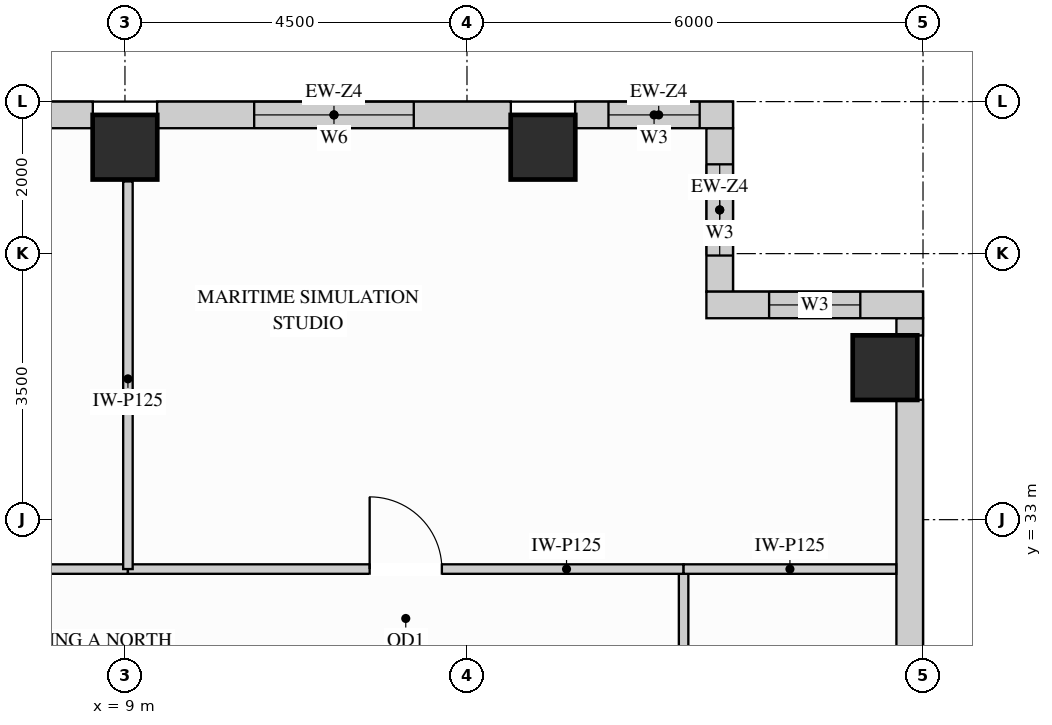
"""IFC4 building model, lengths in metres.
Left out: names, types, materials, properties, quantities, classifications, styles, units other than length and angle.
Written with IfcOpenShell. Run it as: python <this file> out.ifc"""

import sys

from ifc_helpers import new_model, si_unit, direction, frame, frame_2d, origin, origin_2d, place, context, subcontext, project, spatial, rectangle, extrude, source, transform, mapped, element, fill, save


model = new_model("IFC4")
c1 = context("Model", 3, precision=1e-05, world=origin(), true_north=direction((0.0, 1.0)))
c2 = subcontext(c1, "Body", "Model", "MODEL_VIEW")
j1 = project(units=[si_unit("LENGTHUNIT", "METRE"), si_unit("PLANEANGLEUNIT", "RADIAN")], contexts=[c1])
p1 = place(None, origin())
s1 = spatial("IfcSite", under=j1, at=p1, CompositionType="ELEMENT")
p2 = place(p1, origin())
s2 = spatial("IfcBuilding", under=s1, at=p2, CompositionType="ELEMENT")
p3 = place(p2, frame((0.0, 0.0, 266.4)))
s3 = spatial("IfcBuildingStorey", under=s2, at=p3, CompositionType="ELEMENT", Elevation=266.4)
m1 = source(origin(), c2, "Body", "SweptSolid", [
    extrude(rectangle(XDim=0.85, YDim=0.85, at=origin_2d()), origin(), (0.0, 0.0, 1.0), 3.4),
])
for number, where, z_axis, x_axis in (
    (1, (19.0, 35.0, 0.0), (0.0, 0.0, 1.0), (1.0, 0.0, 0.0)),
    (2, (14.5, 37.9, 0.0), (0.0, 0.0, 1.0), (1.0, 0.0, 0.0)),
    (3, (9.0, 37.9, 0.0), (0.0, 0.0, 1.0), (1.0, 0.0, 0.0)),
):
    element("IfcColumn", number, at=place(p3, frame(where, z_axis=z_axis, x_axis=x_axis)), inside=s3, PredefinedType="COLUMN", context=c2, shape_type="MappedRepresentation", body=[
        mapped(m1, transform((0.0, 0.0, 0.0), x_axis=(1.0, 0.0, 0.0), y_axis=(0.0, 1.0, 0.0), z_axis=(0.0, 0.0, 1.0))),
    ])
p4 = place(p3, frame((16.825, 35.998, 0.0), z_axis=(0.0, 0.0, 1.0), x_axis=(0.0, 1.0, 0.0)))
e4 = element("IfcWall", 4, at=p4, inside=s3, PredefinedType="SOLIDWALL", context=c2, shape_type="SweptSolid", body=[
    extrude(rectangle(XDim=2.154, YDim=0.35, at=frame_2d((1.077, 0.0))), origin(), (0.0, 0.0, 1.0), 3.385),
])
p5 = place(p4, frame((0.477, 0.0, 0.78)))
e5 = element("IfcOpeningElement", 5, at=p5, cuts=e4, PredefinedType="OPENING", context=c2, shape_type="SweptSolid", body=[
    extrude(rectangle(XDim=1.2, YDim=2.25, at=frame_2d((0.6, 1.125))), frame((0.0, 0.185, 0.0), z_axis=(0.0, -1.0, 0.0), x_axis=(1.0, 0.0, 0.0)), (0.0, 0.0, 1.0), 0.37),
])
p6 = place(p3, frame((17.0, 38.325, 0.0), z_axis=(0.0, 0.0, 1.0), x_axis=(-1.0, 0.0, 0.0)))
e6 = element("IfcWall", 6, at=p6, inside=s3, PredefinedType="SOLIDWALL", context=c2, shape_type="SweptSolid", body=[
    extrude(rectangle(XDim=2.077, YDim=0.35, at=frame_2d((1.039, 0.0))), origin(), (0.0, 0.0, 1.0), 3.385),
])
p7 = place(p6, frame((0.438, 0.0, 0.78)))
e7 = element("IfcOpeningElement", 7, at=p7, cuts=e6, PredefinedType="OPENING", context=c2, shape_type="SweptSolid", body=[
    extrude(rectangle(XDim=1.2, YDim=2.25, at=frame_2d((0.6, 1.125))), frame((0.0, 0.185, 0.0), z_axis=(0.0, -1.0, 0.0), x_axis=(1.0, 0.0, 0.0)), (0.0, 0.0, 1.0), 0.37),
])
p8 = place(p3, frame((14.077, 38.325, 0.0), z_axis=(0.0, 0.0, 1.0), x_axis=(-1.0, 0.0, 0.0)))
e8 = element("IfcWall", 8, at=p8, inside=s3, PredefinedType="SOLIDWALL", context=c2, shape_type="SweptSolid", body=[
    extrude(rectangle(XDim=4.654, YDim=0.35, at=frame_2d((2.327, 0.0))), origin(), (0.0, 0.0, 1.0), 3.385),
])
p9 = place(p8, frame((1.277, 0.0, 0.78)))
e9 = element("IfcOpeningElement", 9, at=p9, cuts=e8, PredefinedType="OPENING", context=c2, shape_type="SweptSolid", body=[
    extrude(rectangle(XDim=2.1, YDim=2.25, at=frame_2d((1.05, 1.125))), frame((0.0, 0.185, 0.0), z_axis=(0.0, -1.0, 0.0), x_axis=(1.0, 0.0, 0.0)), (0.0, 0.0, 1.0), 0.37),
])
p10 = place(p3, frame((8.577, 38.325, 0.0), z_axis=(0.0, 0.0, 1.0), x_axis=(-1.0, 0.0, 0.0)))
e10 = element("IfcWall", 10, at=p10, inside=s3, PredefinedType="SOLIDWALL", context=c2, shape_type="SweptSolid", body=[
    extrude(rectangle(XDim=4.654, YDim=0.35, at=frame_2d((2.327, 0.0))), origin(), (0.0, 0.0, 1.0), 3.385),
])
p11 = place(p10, frame((1.277, 0.0, 0.78)))
e11 = element("IfcOpeningElement", 11, at=p11, cuts=e10, PredefinedType="OPENING", context=c2, shape_type="SweptSolid", body=[
    extrude(rectangle(XDim=2.1, YDim=2.25, at=frame_2d((1.05, 1.125))), frame((0.0, 0.185, 0.0), z_axis=(0.0, -1.0, 0.0), x_axis=(1.0, 0.0, 0.0)), (0.0, 0.0, 1.0), 0.37),
])
m2 = source(origin(), c2, "Body", "SweptSolid", [
    extrude(rectangle(XDim=3.654, YDim=0.35, at=frame_2d((1.827, 0.0))), origin(), (0.0, 0.0, 1.0), 2.619),
])
p12 = place(p3, frame((19.325, 30.923, 0.0), z_axis=(0.0, 0.0, 1.0), x_axis=(0.0, 1.0, 0.0)))
e12 = element("IfcWall", 12, at=p12, inside=s3, PredefinedType="SOLIDWALL", context=c2, shape_type="MappedRepresentation", body=[
    mapped(m2, transform((0.0, 0.0, 0.0), x_axis=(1.0, 0.0, 0.0), y_axis=(0.0, 1.0, 0.0), z_axis=(0.0, 0.0, 1.0))),
])
m3 = source(origin(), c2, "Body", "SweptSolid", [
    extrude(rectangle(XDim=0.229, YDim=0.35, at=frame_2d((0.115, 0.0))), origin(), (0.0, 0.0, 1.0), 3.385),
])
p13 = place(p3, frame((19.325, 35.423, 0.0), z_axis=(0.0, 0.0, 1.0), x_axis=(0.0, 1.0, 0.0)))
e13 = element("IfcWall", 13, at=p13, inside=s3, PredefinedType="SOLIDWALL", context=c2, shape_type="MappedRepresentation", body=[
    mapped(m3, transform((0.0, 0.0, 0.0), x_axis=(1.0, 0.0, 0.0), y_axis=(0.0, 1.0, 0.0), z_axis=(0.0, 0.0, 1.0))),
])
p14 = place(p3, frame((19.5, 35.825, 0.0), z_axis=(0.0, 0.0, 1.0), x_axis=(-1.0, 0.0, 0.0)))
e14 = element("IfcWall", 14, at=p14, inside=s3, PredefinedType="SOLIDWALL", context=c2, shape_type="SweptSolid", body=[
    extrude(rectangle(XDim=2.85, YDim=0.35, at=frame_2d((1.425, 0.0))), origin(), (0.0, 0.0, 1.0), 3.385),
])
p15 = place(p14, frame((0.825, 0.0, 0.78)))
e15 = element("IfcOpeningElement", 15, at=p15, cuts=e14, PredefinedType="OPENING", context=c2, shape_type="SweptSolid", body=[
    extrude(rectangle(XDim=1.2, YDim=2.25, at=frame_2d((0.6, 1.125))), frame((0.0, 0.185, 0.0), z_axis=(0.0, -1.0, 0.0), x_axis=(1.0, 0.0, 0.0)), (0.0, 0.0, 1.0), 0.37),
])
p16 = place(p3, frame((16.35, 26.05, 0.0), z_axis=(0.0, 0.0, 1.0), x_axis=(0.0, 1.0, 0.0)))
e16 = element("IfcWall", 16, at=p16, inside=s3, PredefinedType="PARTITIONING", context=c2, shape_type="SweptSolid", body=[
    extrude(rectangle(XDim=6.3, YDim=0.125, at=frame_2d((3.15, 0.0))), origin(), (0.0, 0.0, 1.0), 3.385),
])
p17 = place(p16, frame((2.675, 0.0, 0.0)))
e17 = element("IfcOpeningElement", 17, at=p17, cuts=e16, PredefinedType="OPENING", context=c2, shape_type="SweptSolid", body=[
    extrude(rectangle(XDim=0.95, YDim=2.15, at=frame_2d((0.475, 1.075))), frame((0.0, 0.073, 0.0), z_axis=(0.0, -1.0, 0.0), x_axis=(1.0, 0.0, 0.0)), (0.0, 0.0, 1.0), 0.145),
])
p18 = place(p3, frame((2.45, 32.35, 0.0), z_axis=(0.0, 0.0, 1.0), x_axis=(1.0, 0.0, 0.0)))
e18 = element("IfcWall", 18, at=p18, inside=s3, PredefinedType="PARTITIONING", context=c2, shape_type="SweptSolid", body=[
    extrude(rectangle(XDim=6.589, YDim=0.125, at=frame_2d((3.294, 0.0))), origin(), (0.0, 0.0, 1.0), 3.385),
])
p19 = place(p18, frame((2.82, 0.0, 0.0)))
e19 = element("IfcOpeningElement", 19, at=p19, cuts=e18, PredefinedType="OPENING", context=c2, shape_type="SweptSolid", body=[
    extrude(rectangle(XDim=0.95, YDim=2.15, at=frame_2d((0.475, 1.075))), frame((0.0, 0.073, 0.0), z_axis=(0.0, -1.0, 0.0), x_axis=(1.0, 0.0, 0.0)), (0.0, 0.0, 1.0), 0.145),
])
p20 = place(p3, frame((9.039, 32.35, 0.0), z_axis=(0.0, 0.0, 1.0), x_axis=(1.0, 0.0, 0.0)))
e20 = element("IfcWall", 20, at=p20, inside=s3, PredefinedType="PARTITIONING", context=c2, shape_type="SweptSolid", body=[
    extrude(rectangle(XDim=7.311, YDim=0.125, at=frame_2d((3.656, 0.0))), origin(), (0.0, 0.0, 1.0), 3.385),
])
p21 = place(p20, frame((3.18, 0.0, 0.0)))
e21 = element("IfcOpeningElement", 21, at=p21, cuts=e20, PredefinedType="OPENING", context=c2, shape_type="SweptSolid", body=[
    extrude(rectangle(XDim=0.95, YDim=2.15, at=frame_2d((0.475, 1.075))), frame((0.0, 0.073, 0.0), z_axis=(0.0, -1.0, 0.0), x_axis=(1.0, 0.0, 0.0)), (0.0, 0.0, 1.0), 0.145),
])
m4 = source(origin(), c2, "Body", "SweptSolid", [
    extrude(rectangle(XDim=2.798, YDim=0.125, at=frame_2d((1.399, 0.0))), origin(), (0.0, 0.0, 1.0), 3.385),
])
p22 = place(p3, frame((16.35, 32.35, 0.0), z_axis=(0.0, 0.0, 1.0), x_axis=(1.0, 0.0, 0.0)))
e22 = element("IfcWall", 22, at=p22, inside=s3, PredefinedType="PARTITIONING", context=c2, shape_type="MappedRepresentation", body=[
    mapped(m4, transform((0.0, 0.0, 0.0), x_axis=(1.0, 0.0, 0.0), y_axis=(0.0, 1.0, 0.0), z_axis=(0.0, 0.0, 1.0))),
])
m5 = source(origin(), c2, "Body", "SweptSolid", [
    extrude(rectangle(XDim=5.1, YDim=0.125, at=frame_2d((2.55, 0.0))), origin(), (0.0, 0.0, 1.0), 3.385),
])
p23 = place(p3, frame((9.039, 32.35, 0.0), z_axis=(0.0, 0.0, 1.0), x_axis=(0.0, 1.0, 0.0)))
e23 = element("IfcWall", 23, at=p23, inside=s3, PredefinedType="PARTITIONING", context=c2, shape_type="MappedRepresentation", body=[
    mapped(m5, transform((0.0, 0.0, 0.0), x_axis=(1.0, 0.0, 0.0), y_axis=(0.0, 1.0, 0.0), z_axis=(0.0, 0.0, 1.0))),
])
m6 = source(origin(), c2, "Body", "SweptSolid", [
    extrude(rectangle(XDim=0.95, YDim=2.15, at=frame_2d((0.475, 1.075))), frame((0.0, 0.025, 0.0), z_axis=(0.0, -1.0, 0.0), x_axis=(1.0, 0.0, 0.0)), (0.0, 0.0, 1.0), 0.05),
])
p24 = place(p21, origin())
e24 = element("IfcDoor", 24, at=p24, inside=s3, OperationType="SINGLE_SWING_LEFT", PredefinedType="DOOR", context=c2, shape_type="MappedRepresentation", body=[
    mapped(m6, transform((0.0, 0.0, 0.0), x_axis=(1.0, 0.0, 0.0), y_axis=(0.0, 1.0, 0.0), z_axis=(0.0, 0.0, 1.0))),
])
fill(e21, e24)
m7 = source(origin(), c2, "Body", "SweptSolid", [
    extrude(rectangle(XDim=1.2, YDim=2.25, at=frame_2d((0.6, 1.125))), frame((0.0, 0.03, 0.0), z_axis=(0.0, -1.0, 0.0), x_axis=(1.0, 0.0, 0.0)), (0.0, 0.0, 1.0), 0.06),
])
p25 = place(p5, origin())
e25 = element("IfcWindow", 25, at=p25, inside=s3, PartitioningType="SINGLE_PANEL", PredefinedType="WINDOW", context=c2, shape_type="MappedRepresentation", body=[
    mapped(m7, transform((0.0, 0.0, 0.0), x_axis=(1.0, 0.0, 0.0), y_axis=(0.0, 1.0, 0.0), z_axis=(0.0, 0.0, 1.0))),
])
fill(e5, e25)
p26 = place(p7, origin())
e26 = element("IfcWindow", 26, at=p26, inside=s3, PartitioningType="SINGLE_PANEL", PredefinedType="WINDOW", context=c2, shape_type="MappedRepresentation", body=[
    mapped(m7, transform((0.0, 0.0, 0.0), x_axis=(1.0, 0.0, 0.0), y_axis=(0.0, 1.0, 0.0), z_axis=(0.0, 0.0, 1.0))),
])
fill(e7, e26)
p27 = place(p15, origin())
e27 = element("IfcWindow", 27, at=p27, inside=s3, PartitioningType="SINGLE_PANEL", PredefinedType="WINDOW", context=c2, shape_type="MappedRepresentation", body=[
    mapped(m7, transform((0.0, 0.0, 0.0), x_axis=(1.0, 0.0, 0.0), y_axis=(0.0, 1.0, 0.0), z_axis=(0.0, 0.0, 1.0))),
])
fill(e15, e27)
m8 = source(origin(), c2, "Body", "SweptSolid", [
    extrude(rectangle(XDim=2.1, YDim=2.25, at=frame_2d((1.05, 1.125))), frame((0.0, 0.03, 0.0), z_axis=(0.0, -1.0, 0.0), x_axis=(1.0, 0.0, 0.0)), (0.0, 0.0, 1.0), 0.06),
])
p28 = place(p9, origin())
e28 = element("IfcWindow", 28, at=p28, inside=s3, PartitioningType="SINGLE_PANEL", PredefinedType="WINDOW", context=c2, shape_type="MappedRepresentation", body=[
    mapped(m8, transform((0.0, 0.0, 0.0), x_axis=(1.0, 0.0, 0.0), y_axis=(0.0, 1.0, 0.0), z_axis=(0.0, 0.0, 1.0))),
])
fill(e9, e28)
save(model, sys.argv[1])
